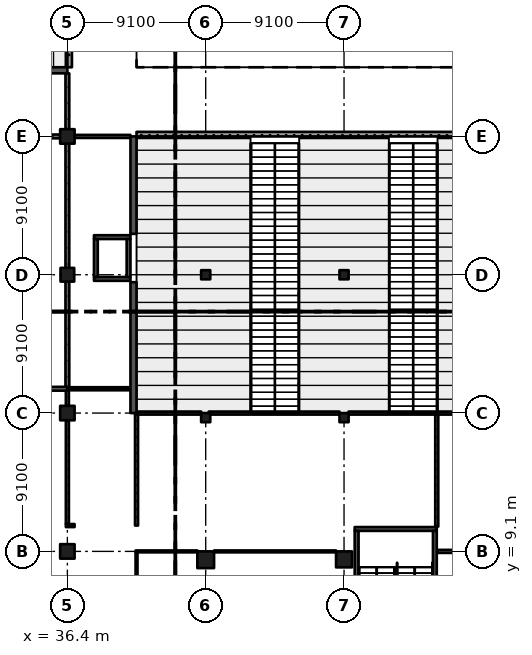
"""IFC4 building model, lengths in metres.
Left out: names, types, materials, properties, quantities, classifications, styles, units other than length and angle.
Written with IfcOpenShell. Run it as: python <this file> out.ifc"""

import sys

from ifc_helpers import new_model, si_unit, direction, frame, frame_2d, origin, origin_2d, place, context, subcontext, project, spatial, rectangle, extrude, element, fill, save


model = new_model("IFC4")
c1 = context("Model", 3, precision=1e-05, world=origin(), true_north=direction((0.0, 1.0)))
c2 = subcontext(c1, "Body", "Model", "MODEL_VIEW")
j1 = project(units=[si_unit("LENGTHUNIT", "METRE"), si_unit("PLANEANGLEUNIT", "RADIAN")], contexts=[c1])
p1 = place(None, origin())
s1 = spatial("IfcSite", under=j1, at=p1, CompositionType="ELEMENT")
p2 = place(p1, origin())
s2 = spatial("IfcBuilding", under=s1, at=p2, CompositionType="ELEMENT")
p3 = place(p2, origin())
s3 = spatial("IfcBuildingStorey", under=s2, at=p3, CompositionType="ELEMENT", Elevation=0.0)
for number, where, z_axis, x_axis in (
    (1, (36.4, 9.1, -0.4), (0.0, 0.0, 1.0), (1.0, 0.0, 0.0)),
    (2, (36.4, 18.2, -0.4), (0.0, 0.0, 1.0), (1.0, 0.0, 0.0)),
):
    element("IfcColumn", number, at=place(p3, frame(where, z_axis=z_axis, x_axis=x_axis)), inside=s3, PredefinedType="COLUMN", context=c2, shape_type="SweptSolid", body=[
        extrude(rectangle(XDim=0.95, YDim=0.95, at=origin_2d()), origin(), (0.0, 0.0, 1.0), 6.77),
    ])
p4 = place(p3, frame((36.4, 27.3, -0.4), z_axis=(0.0, 0.0, 1.0), x_axis=(1.0, 0.0, 0.0)))
e3 = element("IfcColumn", 3, at=p4, inside=s3, PredefinedType="COLUMN", context=c2, shape_type="SweptSolid", body=[
    extrude(rectangle(XDim=0.9, YDim=0.9, at=origin_2d()), origin(), (0.0, 0.0, 1.0), 6.77),
])
p5 = place(p3, frame((36.4, 36.4, -0.4), z_axis=(0.0, 0.0, 1.0), x_axis=(1.0, 0.0, 0.0)))
e4 = element("IfcColumn", 4, at=p5, inside=s3, PredefinedType="COLUMN", context=c2, shape_type="SweptSolid", body=[
    extrude(rectangle(XDim=0.95, YDim=0.95, at=origin_2d()), origin(), (0.0, 0.0, 1.0), 6.77),
])
p6 = place(p3, frame((45.5, 8.55, -0.4), z_axis=(0.0, 0.0, 1.0), x_axis=(1.0, 0.0, 0.0)))
e5 = element("IfcColumn", 5, at=p6, inside=s3, PredefinedType="COLUMN", context=c2, shape_type="SweptSolid", body=[
    extrude(rectangle(XDim=1.1, YDim=1.1, at=origin_2d()), origin(), (0.0, 0.0, 1.0), 6.77),
])
p7 = place(p3, frame((45.5, 17.9, -0.4), z_axis=(0.0, 0.0, 1.0), x_axis=(1.0, 0.0, 0.0)))
e6 = element("IfcColumn", 6, at=p7, inside=s3, PredefinedType="COLUMN", context=c2, shape_type="SweptSolid", body=[
    extrude(rectangle(XDim=0.6, YDim=0.6, at=origin_2d()), origin(), (0.0, 0.0, 1.0), 6.77),
])
p8 = place(p3, frame((45.5, 27.3, -0.4), z_axis=(0.0, 0.0, 1.0), x_axis=(1.0, 0.0, 0.0)))
e7 = element("IfcColumn", 7, at=p8, inside=s3, PredefinedType="COLUMN", context=c2, shape_type="SweptSolid", body=[
    extrude(rectangle(XDim=0.6, YDim=0.6, at=origin_2d()), origin(), (0.0, 0.0, 1.0), 2.133),
])
p9 = place(p3, frame((54.6, 8.575, -0.4), z_axis=(0.0, 0.0, 1.0), x_axis=(1.0, 0.0, 0.0)))
e8 = element("IfcColumn", 8, at=p9, inside=s3, PredefinedType="COLUMN", context=c2, shape_type="SweptSolid", body=[
    extrude(rectangle(XDim=1.05, YDim=1.05, at=origin_2d()), origin(), (0.0, 0.0, 1.0), 6.77),
])
p10 = place(p3, frame((54.6, 17.9, -0.4), z_axis=(0.0, 0.0, 1.0), x_axis=(1.0, 0.0, 0.0)))
e9 = element("IfcColumn", 9, at=p10, inside=s3, PredefinedType="COLUMN", context=c2, shape_type="SweptSolid", body=[
    extrude(rectangle(XDim=0.6, YDim=0.6, at=origin_2d()), origin(), (0.0, 0.0, 1.0), 6.77),
])
p11 = place(p3, frame((54.6, 27.3, -0.4), z_axis=(0.0, 0.0, 1.0), x_axis=(1.0, 0.0, 0.0)))
e10 = element("IfcColumn", 10, at=p11, inside=s3, PredefinedType="COLUMN", context=c2, shape_type="SweptSolid", body=[
    extrude(rectangle(XDim=0.6, YDim=0.6, at=origin_2d()), origin(), (0.0, 0.0, 1.0), 2.133),
])
p12 = place(p3, frame((40.95, 36.55, -0.4), z_axis=(0.0, 0.0, 1.0), x_axis=(1.0, 0.0, 0.0)))
e11 = element("IfcWall", 11, at=p12, inside=s3, PredefinedType="SOLIDWALL", context=c2, shape_type="SweptSolid", body=[
    extrude(rectangle(XDim=63.7, YDim=0.3, at=frame_2d((31.85, 0.0))), origin(), (0.0, 0.0, 1.0), 1.45),
])
p13 = place(p3, frame((36.55, 40.95, -0.4), z_axis=(0.0, 0.0, 1.0), x_axis=(0.0, 1.0, 0.0)))
e12 = element("IfcWall", 12, at=p13, inside=s3, PredefinedType="SOLIDWALL", context=c2, shape_type="SweptSolid", body=[
    extrude(rectangle(XDim=27.3, YDim=0.3, at=frame_2d((13.65, 0.0))), origin(), (0.0, 0.0, 1.0), 1.45),
])
p14 = place(p3, frame((40.75, 26.809, -0.4), z_axis=(0.0, 0.0, 1.0), x_axis=(0.0, -1.0, 0.0)))
e13 = element("IfcWall", 13, at=p14, inside=s3, PredefinedType="SHEAR", context=c2, shape_type="SweptSolid", body=[
    extrude(rectangle(XDim=8.609, YDim=0.4, at=frame_2d((4.304, 0.0))), origin(), (0.0, 0.0, 1.0), 6.77),
])
p15 = place(p3, frame((40.75, 36.4, -0.4), z_axis=(0.0, 0.0, 1.0), x_axis=(0.0, -1.0, 0.0)))
e14 = element("IfcWall", 14, at=p15, inside=s3, PredefinedType="SHEAR", context=c2, shape_type="SweptSolid", body=[
    extrude(rectangle(XDim=6.409, YDim=0.4, at=frame_2d((3.205, 0.0))), origin(), (0.0, 0.0, 1.0), 6.77),
])
p16 = place(p3, frame((36.4, 40.75, -0.4), z_axis=(0.0, 0.0, 1.0), x_axis=(-1.0, 0.0, 0.0)))
e15 = element("IfcWall", 15, at=p16, inside=s3, PredefinedType="SHEAR", context=c2, shape_type="SweptSolid", body=[
    extrude(rectangle(XDim=18.2, YDim=0.4, at=frame_2d((9.1, 0.0))), origin(), (0.0, 0.0, 1.0), 6.77),
])
for number, where, z_axis, x_axis in (
    (16, (40.55, 27.025, -0.4), (0.0, 0.0, 1.0), (-1.0, 0.0, 0.0)),
    (17, (40.55, 29.775, -0.4), (0.0, 0.0, 1.0), (-1.0, 0.0, 0.0)),
):
    element("IfcWall", number, at=place(p3, frame(where, z_axis=z_axis, x_axis=x_axis)), inside=s3, PredefinedType="SHEAR", context=c2, shape_type="SweptSolid", body=[
        extrude(rectangle(XDim=2.4, YDim=0.25, at=frame_2d((1.2, 0.0))), origin(), (0.0, 0.0, 1.0), 6.77),
    ])
p17 = place(p3, frame((38.275, 29.65, -0.4), z_axis=(0.0, 0.0, 1.0), x_axis=(0.0, -1.0, 0.0)))
e18 = element("IfcWall", 18, at=p17, inside=s3, PredefinedType="SHEAR", context=c2, shape_type="SweptSolid", body=[
    extrude(rectangle(XDim=2.5, YDim=0.25, at=frame_2d((1.25, 0.0))), origin(), (0.0, 0.0, 1.0), 6.77),
])
p18 = place(p17, frame((0.8, 0.0, 0.4)))
e19 = element("IfcOpeningElement", 19, at=p18, cuts=e18, PredefinedType="OPENING", context=c2, shape_type="SweptSolid", body=[
    extrude(rectangle(XDim=0.9, YDim=2.1, at=frame_2d((0.45, 1.05))), frame((0.0, 0.135, 0.0), z_axis=(0.0, -1.0, 0.0), x_axis=(1.0, 0.0, 0.0)), (0.0, 0.0, 1.0), 0.27),
])
p19 = place(p3, frame((40.425, 29.65, -0.4), z_axis=(0.0, 0.0, 1.0), x_axis=(0.0, -1.0, 0.0)))
e20 = element("IfcWall", 20, at=p19, inside=s3, PredefinedType="SHEAR", context=c2, shape_type="SweptSolid", body=[
    extrude(rectangle(XDim=2.5, YDim=0.25, at=frame_2d((1.25, 0.0))), origin(), (0.0, 0.0, 1.0), 6.77),
])
p20 = place(p3, frame((60.7, 10.575, -0.4), z_axis=(0.0, 0.0, 1.0), x_axis=(-1.0, 0.0, 0.0)))
e21 = element("IfcWall", 21, at=p20, inside=s3, PredefinedType="SHEAR", context=c2, shape_type="SweptSolid", body=[
    extrude(rectangle(XDim=5.4, YDim=0.25, at=frame_2d((2.7, 0.0))), origin(), (0.0, 0.0, 1.0), 6.77),
])
p21 = place(p20, frame((1.5, 0.0, 0.4)))
e22 = element("IfcOpeningElement", 22, at=p21, cuts=e21, PredefinedType="OPENING", context=c2, shape_type="SweptSolid", body=[
    extrude(rectangle(XDim=2.4, YDim=2.1, at=frame_2d((1.2, 1.05))), frame((0.0, 0.135, 0.0), z_axis=(0.0, -1.0, 0.0), x_axis=(1.0, 0.0, 0.0)), (0.0, 0.0, 1.0), 0.27),
])
for number, where, z_axis, x_axis in (
    (23, (55.425, 10.45, -0.4), (0.0, 0.0, 1.0), (0.0, -1.0, 0.0)),
    (24, (60.575, 10.45, -0.4), (0.0, 0.0, 1.0), (0.0, -1.0, 0.0)),
):
    element("IfcWall", number, at=place(p3, frame(where, z_axis=z_axis, x_axis=x_axis)), inside=s3, PredefinedType="SHEAR", context=c2, shape_type="SweptSolid", body=[
        extrude(rectangle(XDim=9.6, YDim=0.25, at=frame_2d((4.8, 0.0))), origin(), (0.0, 0.0, 1.0), 6.77),
    ])
p22 = place(p3, frame((27.65, 19.8, 0.0), z_axis=(0.0, 0.0, 1.0), x_axis=(1.0, 0.0, 0.0)))
e25 = element("IfcWall", 25, at=p22, inside=s3, PredefinedType="SOLIDWALL", context=c2, shape_type="SweptSolid", body=[
    extrude(rectangle(XDim=8.75, YDim=0.25, at=frame_2d((4.375, 0.0))), origin(), (0.0, 0.0, 1.0), 6.02),
])
p23 = place(p22, frame((3.45, 0.0, 0.0)))
e26 = element("IfcOpeningElement", 26, at=p23, cuts=e25, PredefinedType="OPENING", context=c2, shape_type="SweptSolid", body=[
    extrude(rectangle(XDim=1.8, YDim=2.1, at=frame_2d((0.9, 1.05))), frame((0.0, 0.135, 0.0), z_axis=(0.0, -1.0, 0.0), x_axis=(1.0, 0.0, 0.0)), (0.0, 0.0, 1.0), 0.27),
])
p24 = place(p3, frame((27.775, 36.4, 0.0), z_axis=(0.0, 0.0, 1.0), x_axis=(1.0, 0.0, 0.0)))
e27 = element("IfcWall", 27, at=p24, inside=s3, PredefinedType="SOLIDWALL", context=c2, shape_type="SweptSolid", body=[
    extrude(rectangle(XDim=8.15, YDim=0.25, at=frame_2d((4.075, 0.0))), origin(), (0.0, 0.0, 1.0), 5.32),
])
p25 = place(p3, frame((36.3, 10.8, 0.0), z_axis=(0.0, 0.0, 1.0), x_axis=(1.0, 0.0, 0.0)))
e28 = element("IfcWall", 28, at=p25, inside=s3, PredefinedType="PARTITIONING", context=c2, shape_type="SweptSolid", body=[
    extrude(rectangle(XDim=0.575, YDim=0.2, at=frame_2d((0.288, 0.0))), origin(), (0.0, 0.0, 1.0), 6.02),
])
p26 = place(p3, frame((36.4, 17.725, 0.0), z_axis=(0.0, 0.0, 1.0), x_axis=(0.0, -1.0, 0.0)))
e29 = element("IfcWall", 29, at=p26, inside=s3, PredefinedType="PARTITIONING", context=c2, shape_type="SweptSolid", body=[
    extrude(rectangle(XDim=6.825, YDim=0.2, at=frame_2d((3.413, 0.0))), origin(), (0.0, 0.0, 1.0), 5.32),
])
p27 = place(p26, frame((0.85, 0.0, 0.0)))
e30 = element("IfcOpeningElement", 30, at=p27, cuts=e29, PredefinedType="OPENING", context=c2, shape_type="SweptSolid", body=[
    extrude(rectangle(XDim=1.8, YDim=2.4, at=frame_2d((0.9, 1.2))), frame((0.0, 0.11, 0.0), z_axis=(0.0, -1.0, 0.0), x_axis=(1.0, 0.0, 0.0)), (0.0, 0.0, 1.0), 0.22),
])
p28 = place(p26, frame((4.25, 0.0, 0.0)))
e31 = element("IfcOpeningElement", 31, at=p28, cuts=e29, PredefinedType="OPENING", context=c2, shape_type="SweptSolid", body=[
    extrude(rectangle(XDim=1.8, YDim=2.4, at=frame_2d((0.9, 1.2))), frame((0.0, 0.11, 0.0), z_axis=(0.0, -1.0, 0.0), x_axis=(1.0, 0.0, 0.0)), (0.0, 0.0, 1.0), 0.22),
])
p29 = place(p3, frame((36.4, 19.675, 0.0), z_axis=(0.0, 0.0, 1.0), x_axis=(0.0, -1.0, 0.0)))
e32 = element("IfcWall", 32, at=p29, inside=s3, PredefinedType="PARTITIONING", context=c2, shape_type="SweptSolid", body=[
    extrude(rectangle(XDim=1.0, YDim=0.2, at=frame_2d((0.5, 0.0))), origin(), (0.0, 0.0, 1.0), 5.32),
])
p30 = place(p3, frame((36.4, 19.8, 0.0), z_axis=(0.0, 0.0, 1.0), x_axis=(1.0, 0.0, 0.0)))
e33 = element("IfcWall", 33, at=p30, inside=s3, PredefinedType="PARTITIONING", context=c2, shape_type="SweptSolid", body=[
    extrude(rectangle(XDim=4.15, YDim=0.2, at=frame_2d((2.075, 0.0))), origin(), (0.0, 0.0, 1.0), 6.02),
])
p31 = place(p30, frame((1.15, 0.0, 0.0)))
e34 = element("IfcOpeningElement", 34, at=p31, cuts=e33, PredefinedType="OPENING", context=c2, shape_type="SweptSolid", body=[
    extrude(rectangle(XDim=1.8, YDim=2.4, at=frame_2d((0.9, 1.2))), frame((0.0, 0.11, 0.0), z_axis=(0.0, -1.0, 0.0), x_axis=(1.0, 0.0, 0.0)), (0.0, 0.0, 1.0), 0.22),
])
p32 = place(p3, frame((36.4, 26.85, 0.0), z_axis=(0.0, 0.0, 1.0), x_axis=(0.0, -1.0, 0.0)))
e35 = element("IfcWall", 35, at=p32, inside=s3, PredefinedType="SOLIDWALL", context=c2, shape_type="SweptSolid", body=[
    extrude(rectangle(XDim=6.925, YDim=0.25, at=frame_2d((3.462, 0.0))), origin(), (0.0, 0.0, 1.0), 5.32),
])
p33 = place(p3, frame((36.4, 35.925, 0.0), z_axis=(0.0, 0.0, 1.0), x_axis=(0.0, -1.0, 0.0)))
e36 = element("IfcWall", 36, at=p33, inside=s3, PredefinedType="SOLIDWALL", context=c2, shape_type="SweptSolid", body=[
    extrude(rectangle(XDim=8.175, YDim=0.25, at=frame_2d((4.087, 0.0))), origin(), (0.0, 0.0, 1.0), 5.32),
])
p34 = place(p3, frame((36.4, 40.55, 0.0), z_axis=(0.0, 0.0, 1.0), x_axis=(0.0, -1.0, 0.0)))
e37 = element("IfcWall", 37, at=p34, inside=s3, PredefinedType="SOLIDWALL", context=c2, shape_type="SweptSolid", body=[
    extrude(rectangle(XDim=3.675, YDim=0.25, at=frame_2d((1.837, 0.0))), origin(), (0.0, 0.0, 1.0), 6.02),
])
p35 = place(p34, frame((1.35, 0.0, 0.0)))
e38 = element("IfcOpeningElement", 38, at=p35, cuts=e37, PredefinedType="OPENING", context=c2, shape_type="SweptSolid", body=[
    extrude(rectangle(XDim=1.0, YDim=2.1, at=frame_2d((0.5, 1.05))), frame((0.0, 0.135, 0.0), z_axis=(0.0, -1.0, 0.0), x_axis=(1.0, 0.0, 0.0)), (0.0, 0.0, 1.0), 0.27),
])
p36 = place(p3, frame((36.875, 36.4, 0.0), z_axis=(0.0, 0.0, 1.0), x_axis=(1.0, 0.0, 0.0)))
e39 = element("IfcWall", 39, at=p36, inside=s3, PredefinedType="PARTITIONING", context=c2, shape_type="SweptSolid", body=[
    extrude(rectangle(XDim=3.675, YDim=0.2, at=frame_2d((1.837, 0.0))), origin(), (0.0, 0.0, 1.0), 6.02),
])
p37 = place(p36, frame((0.65, 0.0, 0.0)))
e40 = element("IfcOpeningElement", 40, at=p37, cuts=e39, PredefinedType="OPENING", context=c2, shape_type="SweptSolid", body=[
    extrude(rectangle(XDim=2.4, YDim=2.4, at=frame_2d((1.2, 1.2))), frame((0.0, 0.11, 0.0), z_axis=(0.0, -1.0, 0.0), x_axis=(1.0, 0.0, 0.0)), (0.0, 0.0, 1.0), 0.22),
])
p38 = place(p3, frame((40.85, 18.2, 0.0), z_axis=(0.0, 0.0, 1.0), x_axis=(1.0, 0.0, 0.0)))
e41 = element("IfcWall", 41, at=p38, inside=s3, PredefinedType="PARTITIONING", context=c2, shape_type="SweptSolid", body=[
    extrude(rectangle(XDim=4.35, YDim=0.2, at=frame_2d((2.175, 0.0))), origin(), (0.0, 0.0, 1.0), 5.02),
])
p39 = place(p3, frame((40.95, 9.038, 0.0), z_axis=(0.0, 0.0, 1.0), x_axis=(0.0, -1.0, 0.0)))
e42 = element("IfcWall", 42, at=p39, inside=s3, PredefinedType="PARTITIONING", context=c2, shape_type="SweptSolid", body=[
    extrude(rectangle(XDim=8.888, YDim=0.125, at=frame_2d((4.444, 0.0))), origin(), (0.0, 0.0, 1.0), 6.02),
])
p40 = place(p3, frame((40.95, 18.1, 0.0), z_axis=(0.0, 0.0, 1.0), x_axis=(0.0, -1.0, 0.0)))
e43 = element("IfcWall", 43, at=p40, inside=s3, PredefinedType="PARTITIONING", context=c2, shape_type="SweptSolid", body=[
    extrude(rectangle(XDim=7.3, YDim=0.2, at=frame_2d((3.65, 0.0))), origin(), (0.0, 0.0, 1.0), 6.02),
])
p41 = place(p40, frame((0.95, 0.0, 0.0)))
e44 = element("IfcOpeningElement", 44, at=p41, cuts=e43, PredefinedType="OPENING", context=c2, shape_type="SweptSolid", body=[
    extrude(rectangle(XDim=1.8, YDim=2.4, at=frame_2d((0.9, 1.2))), frame((0.0, 0.11, 0.0), z_axis=(0.0, -1.0, 0.0), x_axis=(1.0, 0.0, 0.0)), (0.0, 0.0, 1.0), 0.22),
])
p42 = place(p40, frame((4.55, 0.0, 0.0)))
e45 = element("IfcOpeningElement", 45, at=p42, cuts=e43, PredefinedType="OPENING", context=c2, shape_type="SweptSolid", body=[
    extrude(rectangle(XDim=1.8, YDim=2.4, at=frame_2d((0.9, 1.2))), frame((0.0, 0.11, 0.0), z_axis=(0.0, -1.0, 0.0), x_axis=(1.0, 0.0, 0.0)), (0.0, 0.0, 1.0), 0.22),
])
p43 = place(p3, frame((44.95, 9.1, 0.0), z_axis=(0.0, 0.0, 1.0), x_axis=(-1.0, 0.0, 0.0)))
e46 = element("IfcWall", 46, at=p43, inside=s3, PredefinedType="PARTITIONING", context=c2, shape_type="SweptSolid", body=[
    extrude(rectangle(XDim=4.062, YDim=0.125, at=frame_2d((2.031, 0.0))), origin(), (0.0, 0.0, 1.0), 5.32),
])
p44 = place(p3, frame((45.7, 18.2, 0.0), z_axis=(0.0, 0.0, 1.0), x_axis=(1.0, 0.0, 0.0)))
e47 = element("IfcWall", 47, at=p44, inside=s3, PredefinedType="PARTITIONING", context=c2, shape_type="SweptSolid", body=[
    extrude(rectangle(XDim=8.6, YDim=0.2, at=frame_2d((4.3, 0.0))), origin(), (0.0, 0.0, 1.0), 5.02),
])
p45 = place(p3, frame((54.075, 9.1, 0.0), z_axis=(0.0, 0.0, 1.0), x_axis=(-1.0, 0.0, 0.0)))
e48 = element("IfcWall", 48, at=p45, inside=s3, PredefinedType="PARTITIONING", context=c2, shape_type="SweptSolid", body=[
    extrude(rectangle(XDim=8.025, YDim=0.125, at=frame_2d((4.012, 0.0))), origin(), (0.0, 0.0, 1.0), 5.32),
])
p46 = place(p45, frame((3.55, 0.0, 0.0)))
e49 = element("IfcOpeningElement", 49, at=p46, cuts=e48, PredefinedType="OPENING", context=c2, shape_type="SweptSolid", body=[
    extrude(rectangle(XDim=0.9, YDim=2.1, at=frame_2d((0.45, 1.05))), frame((0.0, 0.073, 0.0), z_axis=(0.0, -1.0, 0.0), x_axis=(1.0, 0.0, 0.0)), (0.0, 0.0, 1.0), 0.145),
])
p47 = place(p3, frame((54.9, 18.2, 0.0), z_axis=(0.0, 0.0, 1.0), x_axis=(1.0, 0.0, 0.0)))
e50 = element("IfcWall", 50, at=p47, inside=s3, PredefinedType="PARTITIONING", context=c2, shape_type="SweptSolid", body=[
    extrude(rectangle(XDim=8.6, YDim=0.2, at=frame_2d((4.3, 0.0))), origin(), (0.0, 0.0, 1.0), 5.02),
])
p48 = place(p3, frame((60.7, 18.1, 0.0), z_axis=(0.0, 0.0, 1.0), x_axis=(0.0, -1.0, 0.0)))
e51 = element("IfcWall", 51, at=p48, inside=s3, PredefinedType="PARTITIONING", context=c2, shape_type="SweptSolid", body=[
    extrude(rectangle(XDim=7.37, YDim=0.2, at=frame_2d((3.685, 0.0))), origin(), (0.0, 0.0, 1.0), 6.02),
])
p49 = place(p48, frame((2.15, 0.0, 0.0)))
e52 = element("IfcOpeningElement", 52, at=p49, cuts=e51, PredefinedType="OPENING", context=c2, shape_type="SweptSolid", body=[
    extrude(rectangle(XDim=3.0, YDim=2.4, at=frame_2d((1.5, 1.2))), frame((0.0, 0.11, 0.0), z_axis=(0.0, -1.0, 0.0), x_axis=(1.0, 0.0, 0.0)), (0.0, 0.0, 1.0), 0.22),
])
p50 = place(p3, frame((63.25, 9.1, 0.0), z_axis=(0.0, 0.0, 1.0), x_axis=(-1.0, 0.0, 0.0)))
e53 = element("IfcWall", 53, at=p50, inside=s3, PredefinedType="PARTITIONING", context=c2, shape_type="SweptSolid", body=[
    extrude(rectangle(XDim=2.52, YDim=0.2, at=frame_2d((1.26, 0.0))), origin(), (0.0, 0.0, 1.0), 5.57),
])
p51 = place(p35, origin())
e54 = element("IfcDoor", 54, at=p51, inside=s3, OperationType="SINGLE_SWING_RIGHT", PredefinedType="DOOR", context=c2, shape_type="SweptSolid", body=[
    extrude(rectangle(XDim=1.0, YDim=2.1, at=frame_2d((0.5, 1.05))), frame((0.0, 0.025, 0.0), z_axis=(0.0, -1.0, 0.0), x_axis=(1.0, 0.0, 0.0)), (0.0, 0.0, 1.0), 0.05),
])
fill(e38, e54)
p52 = place(p46, origin())
e55 = element("IfcDoor", 55, at=p52, inside=s3, OperationType="SINGLE_SWING_RIGHT", PredefinedType="DOOR", context=c2, shape_type="SweptSolid", body=[
    extrude(rectangle(XDim=0.9, YDim=2.1, at=frame_2d((0.45, 1.05))), frame((0.0, 0.025, 0.0), z_axis=(0.0, -1.0, 0.0), x_axis=(1.0, 0.0, 0.0)), (0.0, 0.0, 1.0), 0.05),
])
fill(e49, e55)
p53 = place(p37, origin())
e56 = element("IfcDoor", 56, at=p53, inside=s3, OperationType="DOUBLE_DOOR_SINGLE_SWING", PredefinedType="DOOR", context=c2, shape_type="SweptSolid", body=[
    extrude(rectangle(XDim=2.4, YDim=2.4, at=frame_2d((1.2, 1.2))), frame((0.0, 0.025, 0.0), z_axis=(0.0, -1.0, 0.0), x_axis=(1.0, 0.0, 0.0)), (0.0, 0.0, 1.0), 0.05),
])
fill(e40, e56)
p54 = place(p27, origin())
e57 = element("IfcDoor", 57, at=p54, inside=s3, OperationType="DOUBLE_DOOR_SINGLE_SWING", PredefinedType="DOOR", context=c2, shape_type="SweptSolid", body=[
    extrude(rectangle(XDim=1.8, YDim=2.4, at=frame_2d((0.9, 1.2))), frame((0.0, 0.025, 0.0), z_axis=(0.0, -1.0, 0.0), x_axis=(1.0, 0.0, 0.0)), (0.0, 0.0, 1.0), 0.05),
])
fill(e30, e57)
p55 = place(p28, origin())
e58 = element("IfcDoor", 58, at=p55, inside=s3, OperationType="DOUBLE_DOOR_SINGLE_SWING", PredefinedType="DOOR", context=c2, shape_type="SweptSolid", body=[
    extrude(rectangle(XDim=1.8, YDim=2.4, at=frame_2d((0.9, 1.2))), frame((0.0, 0.025, 0.0), z_axis=(0.0, -1.0, 0.0), x_axis=(1.0, 0.0, 0.0)), (0.0, 0.0, 1.0), 0.05),
])
fill(e31, e58)
p56 = place(p31, origin())
e59 = element("IfcDoor", 59, at=p56, inside=s3, OperationType="DOUBLE_DOOR_SINGLE_SWING", PredefinedType="DOOR", context=c2, shape_type="SweptSolid", body=[
    extrude(rectangle(XDim=1.8, YDim=2.4, at=frame_2d((0.9, 1.2))), frame((0.0, 0.025, 0.0), z_axis=(0.0, -1.0, 0.0), x_axis=(1.0, 0.0, 0.0)), (0.0, 0.0, 1.0), 0.05),
])
fill(e34, e59)
p57 = place(p41, origin())
e60 = element("IfcDoor", 60, at=p57, inside=s3, OperationType="DOUBLE_DOOR_SINGLE_SWING", PredefinedType="DOOR", context=c2, shape_type="SweptSolid", body=[
    extrude(rectangle(XDim=1.8, YDim=2.4, at=frame_2d((0.9, 1.2))), frame((0.0, 0.025, 0.0), z_axis=(0.0, -1.0, 0.0), x_axis=(1.0, 0.0, 0.0)), (0.0, 0.0, 1.0), 0.05),
])
fill(e44, e60)
p58 = place(p42, origin())
e61 = element("IfcDoor", 61, at=p58, inside=s3, OperationType="DOUBLE_DOOR_SINGLE_SWING", PredefinedType="DOOR", context=c2, shape_type="SweptSolid", body=[
    extrude(rectangle(XDim=1.8, YDim=2.4, at=frame_2d((0.9, 1.2))), frame((0.0, 0.025, 0.0), z_axis=(0.0, -1.0, 0.0), x_axis=(1.0, 0.0, 0.0)), (0.0, 0.0, 1.0), 0.05),
])
fill(e45, e61)
p59 = place(p49, origin())
e62 = element("IfcDoor", 62, at=p59, inside=s3, OperationType="DOUBLE_DOOR_SINGLE_SWING", PredefinedType="DOOR", context=c2, shape_type="SweptSolid", body=[
    extrude(rectangle(XDim=3.0, YDim=2.4, at=frame_2d((1.5, 1.2))), frame((0.0, 0.025, 0.0), z_axis=(0.0, -1.0, 0.0), x_axis=(1.0, 0.0, 0.0)), (0.0, 0.0, 1.0), 0.05),
])
fill(e52, e62)
p60 = place(p18, origin())
e63 = element("IfcDoor", 63, at=p60, inside=s3, OperationType="SINGLE_SWING_LEFT", PredefinedType="DOOR", context=c2, shape_type="SweptSolid", body=[
    extrude(rectangle(XDim=0.9, YDim=2.1, at=frame_2d((0.45, 1.05))), frame((0.0, 0.025, 0.0), z_axis=(0.0, -1.0, 0.0), x_axis=(1.0, 0.0, 0.0)), (0.0, 0.0, 1.0), 0.05),
])
fill(e19, e63)
p61 = place(p21, origin())
e64 = element("IfcDoor", 64, at=p61, inside=s3, OperationType="DOUBLE_DOOR_SINGLE_SWING", PredefinedType="DOOR", context=c2, shape_type="SweptSolid", body=[
    extrude(rectangle(XDim=2.4, YDim=2.1, at=frame_2d((1.2, 1.05))), frame((0.0, 0.025, 0.0), z_axis=(0.0, -1.0, 0.0), x_axis=(1.0, 0.0, 0.0)), (0.0, 0.0, 1.0), 0.05),
])
fill(e22, e64)
save(model, sys.argv[1])
